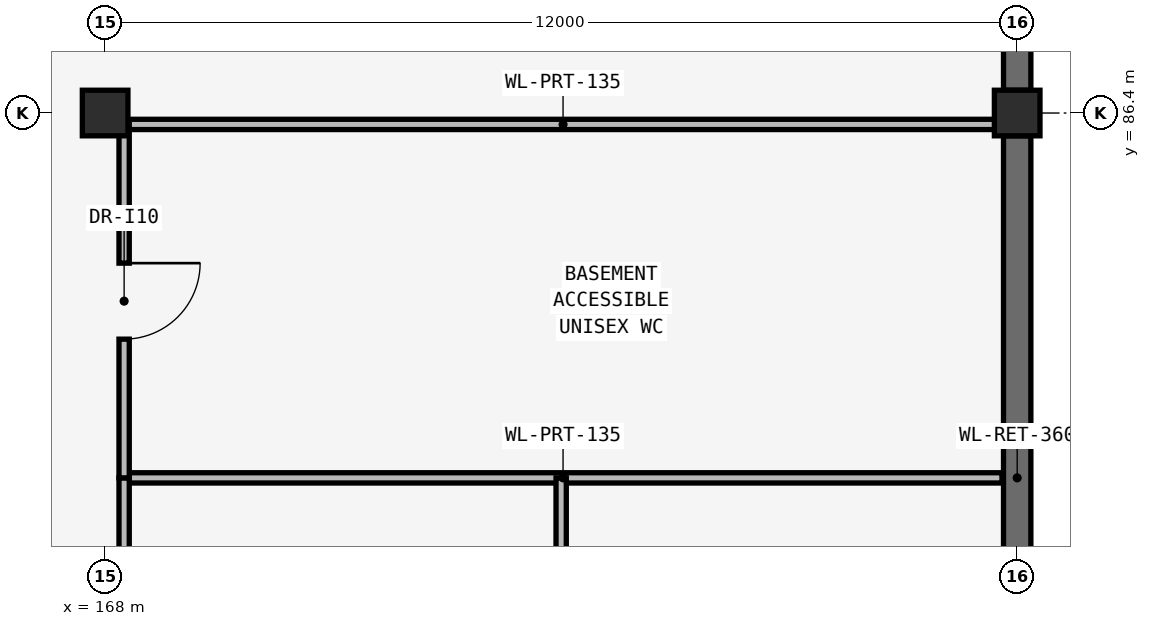
"""IFC4 building model, lengths in metres.
Left out: names, types, materials, properties, quantities, classifications, styles, units other than length and angle.
Written with IfcOpenShell. Run it as: python <this file> out.ifc"""

import sys

from ifc_helpers import new_model, si_unit, direction, frame, frame_2d, origin, origin_2d, place, context, subcontext, project, spatial, rectangle, extrude, element, fill, save


model = new_model("IFC4")
c1 = context("Model", 3, precision=1e-05, world=origin(), true_north=direction((0.0, 1.0)))
c2 = subcontext(c1, "Body", "Model", "MODEL_VIEW")
j1 = project(units=[si_unit("LENGTHUNIT", "METRE"), si_unit("PLANEANGLEUNIT", "RADIAN")], contexts=[c1])
p1 = place(None, origin())
s1 = spatial("IfcSite", under=j1, at=p1, CompositionType="ELEMENT")
p2 = place(p1, origin())
s2 = spatial("IfcBuilding", under=s1, at=p2, CompositionType="ELEMENT")
p3 = place(p2, frame((0.0, 0.0, -4.5)))
s3 = spatial("IfcBuildingStorey", under=s2, at=p3, CompositionType="ELEMENT", Elevation=-4.5)
for number, where, z_axis, x_axis in (
    (1, (168.0, 86.4, -0.35), (0.0, 0.0, 1.0), (1.0, 0.0, 0.0)),
    (2, (180.0, 86.4, -0.35), (0.0, 0.0, 1.0), (1.0, 0.0, 0.0)),
):
    element("IfcColumn", number, at=place(p3, frame(where, z_axis=z_axis, x_axis=x_axis)), inside=s3, PredefinedType="COLUMN", context=c2, shape_type="SweptSolid", body=[
        extrude(rectangle(XDim=0.6, YDim=0.6, at=origin_2d()), origin(), (0.0, 0.0, 1.0), 4.85),
    ])
for number, where, z_axis, x_axis in (
    (3, (180.0, 77.1, 0.0), (0.0, 0.0, 1.0), (0.0, 1.0, 0.0)),
    (4, (180.0, 86.7, 0.0), (0.0, 0.0, 1.0), (0.0, 1.0, 0.0)),
):
    element("IfcWall", number, at=place(p3, frame(where, z_axis=z_axis, x_axis=x_axis)), inside=s3, PredefinedType="USERDEFINED", context=c2, shape_type="SweptSolid", body=[
        extrude(rectangle(XDim=9.0, YDim=0.36, at=frame_2d((4.5, 0.0))), origin(), (0.0, 0.0, 1.0), 4.15),
    ])
p4 = place(p3, frame((168.25, 81.6, 0.0), z_axis=(0.0, 0.0, 1.0), x_axis=(1.0, 0.0, 0.0)))
e5 = element("IfcWall", 5, at=p4, inside=s3, PredefinedType="PARTITIONING", context=c2, shape_type="SweptSolid", body=[
    extrude(rectangle(XDim=11.55, YDim=0.135, at=frame_2d((5.775, 0.0))), origin(), (0.0, 0.0, 1.0), 4.15),
])
p5 = place(p3, frame((168.25, 86.25, 0.0), z_axis=(0.0, 0.0, 1.0), x_axis=(1.0, 0.0, 0.0)))
e6 = element("IfcWall", 6, at=p5, inside=s3, PredefinedType="PARTITIONING", context=c2, shape_type="SweptSolid", body=[
    extrude(rectangle(XDim=11.55, YDim=0.135, at=frame_2d((5.775, 0.0))), origin(), (0.0, 0.0, 1.0), 3.39),
])
p6 = place(p3, frame((174.0, 77.05, 0.0), z_axis=(0.0, 0.0, 1.0), x_axis=(0.0, 1.0, 0.0)))
e7 = element("IfcWall", 7, at=p6, inside=s3, PredefinedType="PARTITIONING", context=c2, shape_type="SweptSolid", body=[
    extrude(rectangle(XDim=4.55, YDim=0.135, at=frame_2d((2.275, 0.0))), origin(), (0.0, 0.0, 1.0), 3.784),
])
p7 = place(p3, frame((168.25, 77.05, 0.0), z_axis=(0.0, 0.0, 1.0), x_axis=(0.0, 1.0, 0.0)))
e8 = element("IfcWall", 8, at=p7, inside=s3, PredefinedType="PARTITIONING", context=c2, shape_type="SweptSolid", body=[
    extrude(rectangle(XDim=4.55, YDim=0.135, at=frame_2d((2.275, 0.0))), origin(), (0.0, 0.0, 1.0), 3.39),
])
p8 = place(p7, frame((1.8, 0.0, 0.0)))
e9 = element("IfcOpeningElement", 9, at=p8, cuts=e8, PredefinedType="OPENING", context=c2, shape_type="SweptSolid", body=[
    extrude(rectangle(XDim=0.95, YDim=2.1, at=frame_2d((0.475, 1.05))), frame((0.0, 0.083, 0.0), z_axis=(0.0, -1.0, 0.0), x_axis=(1.0, 0.0, 0.0)), (0.0, 0.0, 1.0), 0.165),
])
p9 = place(p3, frame((168.25, 81.6, 0.0), z_axis=(0.0, 0.0, 1.0), x_axis=(0.0, 1.0, 0.0)))
e10 = element("IfcWall", 10, at=p9, inside=s3, PredefinedType="PARTITIONING", context=c2, shape_type="SweptSolid", body=[
    extrude(rectangle(XDim=4.65, YDim=0.135, at=frame_2d((2.325, 0.0))), origin(), (0.0, 0.0, 1.0), 3.39),
])
p10 = place(p9, frame((1.825, 0.0, 0.0)))
e11 = element("IfcOpeningElement", 11, at=p10, cuts=e10, PredefinedType="OPENING", context=c2, shape_type="SweptSolid", body=[
    extrude(rectangle(XDim=1.0, YDim=2.1, at=frame_2d((0.5, 1.05))), frame((0.0, 0.083, 0.0), z_axis=(0.0, -1.0, 0.0), x_axis=(1.0, 0.0, 0.0)), (0.0, 0.0, 1.0), 0.165),
])
p11 = place(p10, origin())
e12 = element("IfcDoor", 12, at=p11, inside=s3, OperationType="SINGLE_SWING_RIGHT", PredefinedType="DOOR", context=c2, shape_type="SweptSolid", body=[
    extrude(rectangle(XDim=1.0, YDim=2.1, at=frame_2d((0.5, 1.05))), frame((0.0, 0.025, 0.0), z_axis=(0.0, -1.0, 0.0), x_axis=(1.0, 0.0, 0.0)), (0.0, 0.0, 1.0), 0.05),
])
fill(e11, e12)
save(model, sys.argv[1])
